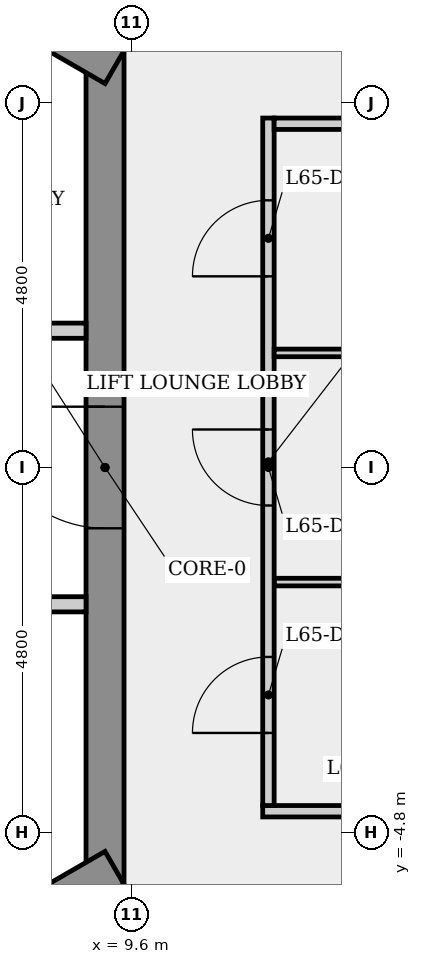
"""IFC4 building model, lengths in metres.
Left out: names, types, materials, properties, quantities, classifications, styles, units other than length and angle.
Written with IfcOpenShell. Run it as: python <this file> out.ifc"""

import sys

from ifc_helpers import new_model, si_unit, direction, frame, frame_2d, origin, place, context, subcontext, project, spatial, rectangle, extrude, element, fill, save


model = new_model("IFC4")
c1 = context("Model", 3, precision=1e-05, world=origin(), true_north=direction((0.0, 1.0)))
c2 = subcontext(c1, "Body", "Model", "MODEL_VIEW")
j1 = project(units=[si_unit("LENGTHUNIT", "METRE"), si_unit("PLANEANGLEUNIT", "RADIAN")], contexts=[c1])
p1 = place(None, origin())
s1 = spatial("IfcSite", under=j1, at=p1, CompositionType="ELEMENT")
p2 = place(p1, origin())
s2 = spatial("IfcBuilding", under=s1, at=p2, CompositionType="ELEMENT")
p3 = place(p2, frame((0.0, 0.0, 242.7)))
s3 = spatial("IfcBuildingStorey", under=s2, at=p3, CompositionType="ELEMENT", Elevation=242.7)
p4 = place(p3, frame((9.25, -5.485, 0.0), z_axis=(0.0, 0.0, 1.0), x_axis=(0.0, 1.0, 0.0)))
e1 = element("IfcWall", 1, at=p4, inside=s3, PredefinedType="SHEAR", context=c2, shape_type="SweptSolid", body=[
    extrude(rectangle(XDim=10.97, YDim=0.5, at=frame_2d((5.485, 0.0))), origin(), (0.0, 0.0, 1.0), 3.4),
])
p5 = place(p4, frame((4.685, 0.0, 0.0)))
e2 = element("IfcOpeningElement", 2, at=p5, cuts=e1, PredefinedType="OPENING", context=c2, shape_type="SweptSolid", body=[
    extrude(rectangle(XDim=1.6, YDim=2.1, at=frame_2d((0.8, 1.05))), frame((0.0, 0.26, 0.0), z_axis=(0.0, -1.0, 0.0), x_axis=(1.0, 0.0, 0.0)), (0.0, 0.0, 1.0), 0.52),
])
p6 = place(p3, frame((9.375, 5.268, 0.0), z_axis=(0.0, 0.0, 1.0), x_axis=(-0.866023993627, 0.500002442456, 0.0)))
e3 = element("IfcWall", 3, at=p6, inside=s3, PredefinedType="SHEAR", context=c2, shape_type="SweptSolid", body=[
    extrude(rectangle(XDim=10.97, YDim=0.5, at=frame_2d((5.485, 0.0))), origin(), (0.0, 0.0, 1.0), 3.4),
])
p7 = place(p6, frame((8.383, 0.0, 0.0)))
e4 = element("IfcOpeningElement", 4, at=p7, cuts=e3, PredefinedType="OPENING", context=c2, shape_type="SweptSolid", body=[
    extrude(rectangle(XDim=0.9, YDim=2.1, at=frame_2d((0.45, 1.05))), frame((0.0, 0.26, 0.0), z_axis=(0.0, -1.0, 0.0), x_axis=(1.0, 0.0, 0.0)), (0.0, 0.0, 1.0), 0.52),
])
p8 = place(p6, frame((3.165, 0.0, 0.0)))
e5 = element("IfcOpeningElement", 5, at=p8, cuts=e3, PredefinedType="OPENING", context=c2, shape_type="SweptSolid", body=[
    extrude(rectangle(XDim=0.9, YDim=2.1, at=frame_2d((0.45, 1.05))), frame((0.0, 0.26, 0.0), z_axis=(0.0, -1.0, 0.0), x_axis=(1.0, 0.0, 0.0)), (0.0, 0.0, 1.0), 0.52),
])
p9 = place(p3, frame((-0.125, -10.753, 0.0), z_axis=(0.0, 0.0, 1.0), x_axis=(0.866023993627, 0.500002442456, 0.0)))
e6 = element("IfcWall", 6, at=p9, inside=s3, PredefinedType="SHEAR", context=c2, shape_type="SweptSolid", body=[
    extrude(rectangle(XDim=10.97, YDim=0.5, at=frame_2d((5.485, 0.0))), origin(), (0.0, 0.0, 1.0), 3.4),
])
p10 = place(p9, frame((7.657, 0.0, 0.0)))
e7 = element("IfcOpeningElement", 7, at=p10, cuts=e6, PredefinedType="OPENING", context=c2, shape_type="SweptSolid", body=[
    extrude(rectangle(XDim=0.9, YDim=2.1, at=frame_2d((0.45, 1.05))), frame((0.0, 0.26, 0.0), z_axis=(0.0, -1.0, 0.0), x_axis=(1.0, 0.0, 0.0)), (0.0, 0.0, 1.0), 0.52),
])
for number, where, z_axis, x_axis in (
    (8, (7.475, 1.8, 0.0), (0.0, 0.0, 1.0), (1.0, 0.0, 0.0)),
    (9, (9.0, -1.8, 0.0), (0.0, 0.0, 1.0), (-1.0, 0.0, 0.0)),
):
    element("IfcWall", number, at=place(p3, frame(where, z_axis=z_axis, x_axis=x_axis)), inside=s3, PredefinedType="PARTITIONING", context=c2, shape_type="SweptSolid", body=[
        extrude(rectangle(XDim=1.525, YDim=0.2, at=frame_2d((0.763, 0.0))), origin(), (0.0, 0.0, 1.0), 3.05),
    ])
p11 = place(p3, frame((11.325, -4.523, 0.0), z_axis=(0.0, 0.0, 1.0), x_axis=(1.0, 0.0, 0.0)))
e10 = element("IfcWall", 10, at=p11, inside=s3, PredefinedType="PARTITIONING", context=c2, shape_type="SweptSolid", body=[
    extrude(rectangle(XDim=2.993, YDim=0.15, at=frame_2d((1.496, 0.0))), origin(), (0.0, 0.0, 1.0), 3.05),
])
p12 = place(p3, frame((11.475, -1.508, 0.0), z_axis=(0.0, 0.0, 1.0), x_axis=(1.0, 0.0, 0.0)))
e11 = element("IfcWall", 11, at=p12, inside=s3, PredefinedType="PARTITIONING", context=c2, shape_type="SweptSolid", body=[
    extrude(rectangle(XDim=5.412, YDim=0.1, at=frame_2d((2.706, 0.0))), origin(), (0.0, 0.0, 1.0), 3.05),
])
p13 = place(p3, frame((11.4, -4.448, 0.0), z_axis=(0.0, 0.0, 1.0), x_axis=(0.0, 1.0, 0.0)))
e12 = element("IfcWall", 12, at=p13, inside=s3, PredefinedType="PARTITIONING", context=c2, shape_type="SweptSolid", body=[
    extrude(rectangle(XDim=9.046, YDim=0.15, at=frame_2d((4.523, 0.0))), origin(), (0.0, 0.0, 1.0), 3.05),
])
p14 = place(p13, frame((0.955, 0.0, 0.0)))
e13 = element("IfcOpeningElement", 13, at=p14, cuts=e12, PredefinedType="OPENING", context=c2, shape_type="SweptSolid", body=[
    extrude(rectangle(XDim=1.0, YDim=2.1, at=frame_2d((0.5, 1.05))), frame((0.0, 0.085, 0.0), z_axis=(0.0, -1.0, 0.0), x_axis=(1.0, 0.0, 0.0)), (0.0, 0.0, 1.0), 0.17),
])
p15 = place(p13, frame((3.948, 0.0, 0.0)))
e14 = element("IfcOpeningElement", 14, at=p15, cuts=e12, PredefinedType="OPENING", context=c2, shape_type="SweptSolid", body=[
    extrude(rectangle(XDim=1.0, YDim=2.1, at=frame_2d((0.5, 1.05))), frame((0.0, 0.085, 0.0), z_axis=(0.0, -1.0, 0.0), x_axis=(1.0, 0.0, 0.0)), (0.0, 0.0, 1.0), 0.17),
])
p16 = place(p13, frame((6.963, 0.0, 0.0)))
e15 = element("IfcOpeningElement", 15, at=p16, cuts=e12, PredefinedType="OPENING", context=c2, shape_type="SweptSolid", body=[
    extrude(rectangle(XDim=1.0, YDim=2.1, at=frame_2d((0.5, 1.05))), frame((0.0, 0.085, 0.0), z_axis=(0.0, -1.0, 0.0), x_axis=(1.0, 0.0, 0.0)), (0.0, 0.0, 1.0), 0.17),
])
p17 = place(p3, frame((11.475, 1.508, 0.0), z_axis=(0.0, 0.0, 1.0), x_axis=(1.0, 0.0, 0.0)))
e16 = element("IfcWall", 16, at=p17, inside=s3, PredefinedType="PARTITIONING", context=c2, shape_type="SweptSolid", body=[
    extrude(rectangle(XDim=5.412, YDim=0.1, at=frame_2d((2.706, 0.0))), origin(), (0.0, 0.0, 1.0), 3.05),
])
p18 = place(p3, frame((14.168, 4.523, 0.0), z_axis=(0.0, 0.0, 1.0), x_axis=(-1.0, 0.0, 0.0)))
e17 = element("IfcWall", 17, at=p18, inside=s3, PredefinedType="PARTITIONING", context=c2, shape_type="SweptSolid", body=[
    extrude(rectangle(XDim=2.693, YDim=0.15, at=frame_2d((1.346, 0.0))), origin(), (0.0, 0.0, 1.0), 3.05),
])
p19 = place(p3, frame((14.205, -4.588, 0.0), z_axis=(0.0, 0.0, 1.0), x_axis=(-0.499994358189, -0.866028661061, 0.0)))
e18 = element("IfcWall", 18, at=p19, inside=s3, PredefinedType="PARTITIONING", context=c2, shape_type="SweptSolid", body=[
    extrude(rectangle(XDim=6.606, YDim=0.15, at=frame_2d((3.303, 0.0))), origin(), (0.0, 0.0, 1.0), 3.05),
])
p20 = place(p19, frame((2.803, 0.0, 0.0)))
e19 = element("IfcOpeningElement", 19, at=p20, cuts=e18, PredefinedType="OPENING", context=c2, shape_type="SweptSolid", body=[
    extrude(rectangle(XDim=1.0, YDim=2.1, at=frame_2d((0.5, 1.05))), frame((0.0, 0.085, 0.0), z_axis=(0.0, -1.0, 0.0), x_axis=(1.0, 0.0, 0.0)), (0.0, 0.0, 1.0), 0.17),
])
p21 = place(p14, origin())
e20 = element("IfcDoor", 20, at=p21, inside=s3, OperationType="SINGLE_SWING_LEFT", PredefinedType="DOOR", context=c2, shape_type="SweptSolid", body=[
    extrude(rectangle(XDim=1.0, YDim=2.1, at=frame_2d((0.5, 1.05))), frame((0.0, 0.025, 0.0), z_axis=(0.0, -1.0, 0.0), x_axis=(1.0, 0.0, 0.0)), (0.0, 0.0, 1.0), 0.05),
])
fill(e13, e20)
p22 = place(p15, origin())
e21 = element("IfcDoor", 21, at=p22, inside=s3, OperationType="SINGLE_SWING_RIGHT", PredefinedType="DOOR", context=c2, shape_type="SweptSolid", body=[
    extrude(rectangle(XDim=1.0, YDim=2.1, at=frame_2d((0.5, 1.05))), frame((0.0, 0.025, 0.0), z_axis=(0.0, -1.0, 0.0), x_axis=(1.0, 0.0, 0.0)), (0.0, 0.0, 1.0), 0.05),
])
fill(e14, e21)
p23 = place(p16, origin())
e22 = element("IfcDoor", 22, at=p23, inside=s3, OperationType="SINGLE_SWING_LEFT", PredefinedType="DOOR", context=c2, shape_type="SweptSolid", body=[
    extrude(rectangle(XDim=1.0, YDim=2.1, at=frame_2d((0.5, 1.05))), frame((0.0, 0.025, 0.0), z_axis=(0.0, -1.0, 0.0), x_axis=(1.0, 0.0, 0.0)), (0.0, 0.0, 1.0), 0.05),
])
fill(e15, e22)
p24 = place(p5, origin())
e23 = element("IfcDoor", 23, at=p24, inside=s3, OperationType="SINGLE_SWING_RIGHT", PredefinedType="DOOR", context=c2, shape_type="SweptSolid", body=[
    extrude(rectangle(XDim=1.6, YDim=2.1, at=frame_2d((0.8, 1.05))), frame((0.0, 0.025, 0.0), z_axis=(0.0, -1.0, 0.0), x_axis=(1.0, 0.0, 0.0)), (0.0, 0.0, 1.0), 0.05),
])
fill(e2, e23)
save(model, sys.argv[1])
